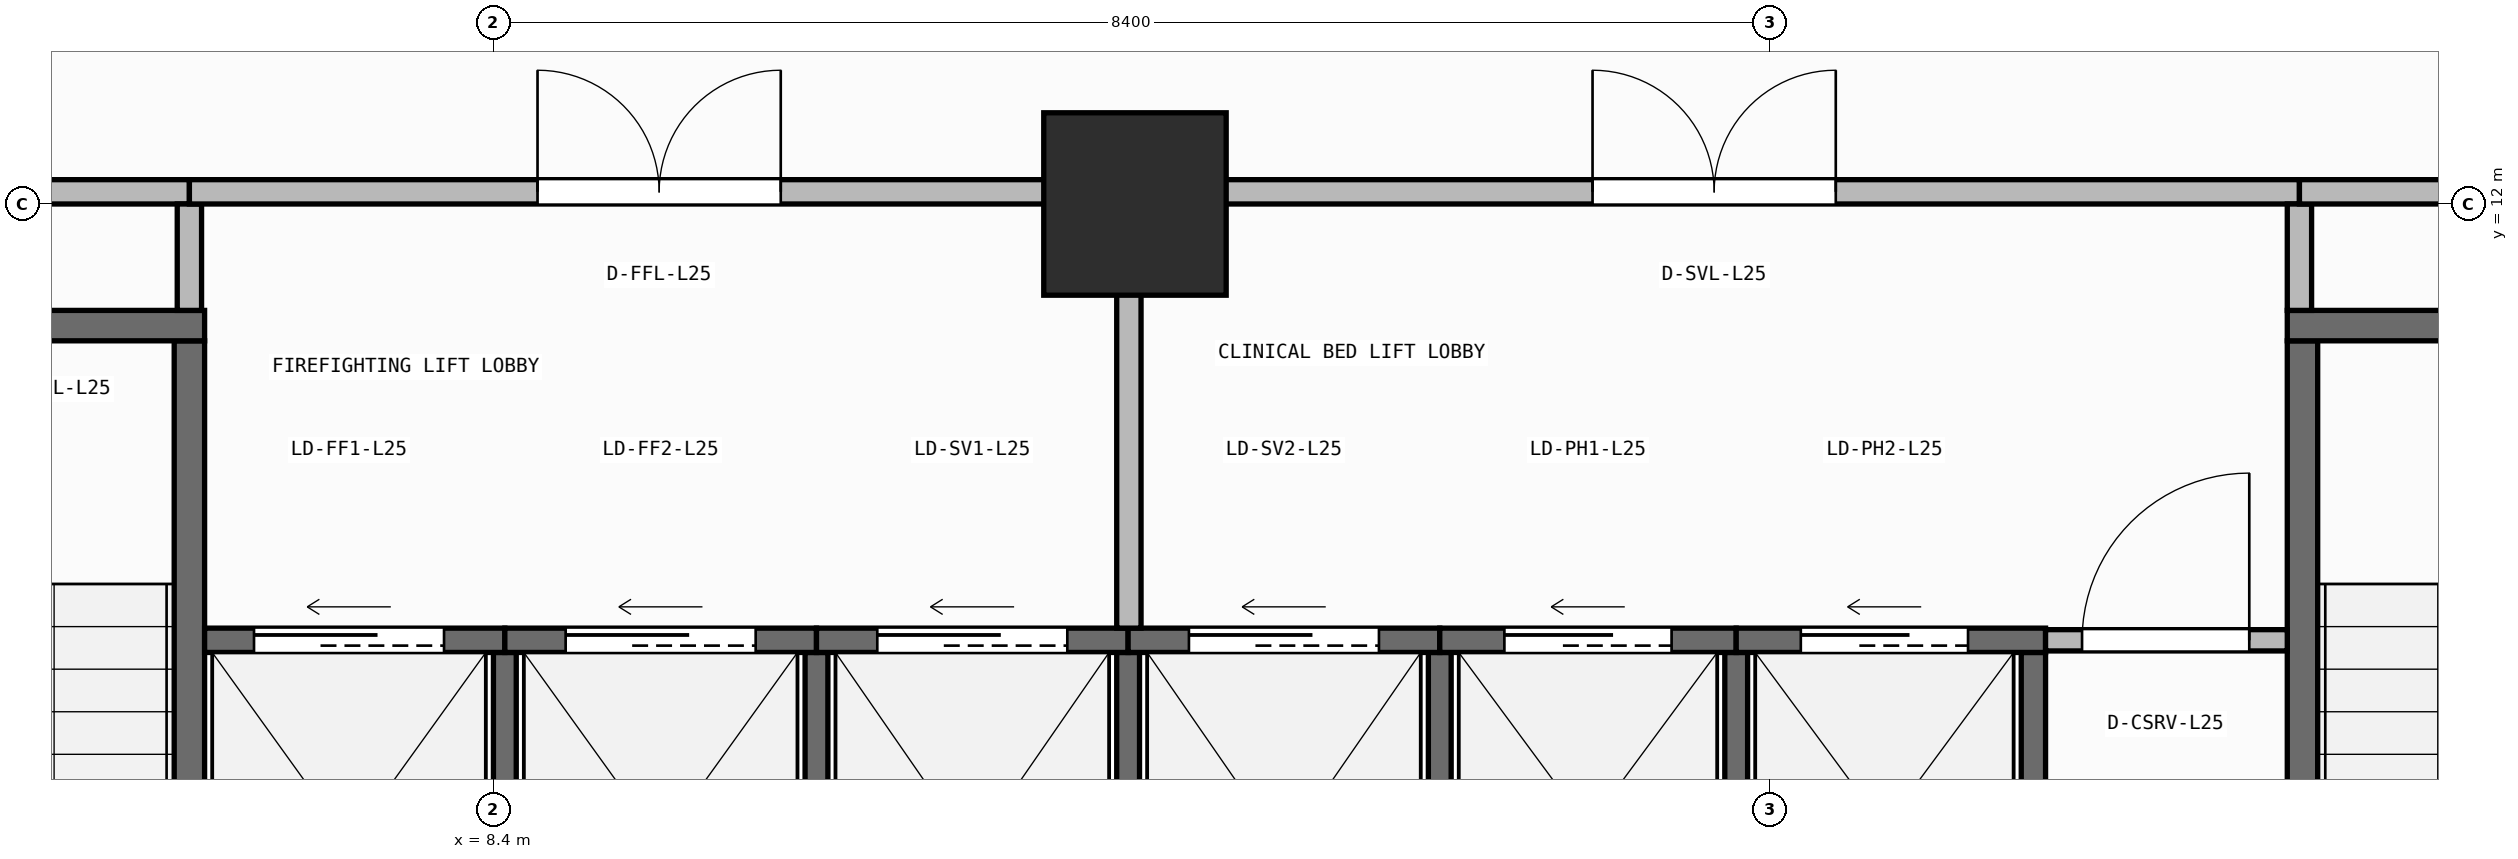
"""IFC4 building model, lengths in metres.
Left out: names, types, materials, properties, quantities, classifications, styles, units other than length and angle.
Written with IfcOpenShell. Run it as: python <this file> out.ifc"""

import sys

from ifc_helpers import new_model, si_unit, direction, frame, frame_2d, origin, origin_2d, place, context, subcontext, project, spatial, rectangle, extrude, element, fill, save


model = new_model("IFC4")
c1 = context("Model", 3, precision=1e-05, world=origin(), true_north=direction((0.0, 1.0)))
c2 = subcontext(c1, "Body", "Model", "MODEL_VIEW")
j1 = project(units=[si_unit("LENGTHUNIT", "METRE"), si_unit("PLANEANGLEUNIT", "RADIAN")], contexts=[c1])
p1 = place(None, origin())
s1 = spatial("IfcSite", under=j1, at=p1, CompositionType="ELEMENT")
p2 = place(p1, origin())
s2 = spatial("IfcBuilding", under=s1, at=p2, CompositionType="ELEMENT")
p3 = place(p2, frame((0.0, 0.0, 97.55)))
s3 = spatial("IfcBuildingStorey", under=s2, at=p3, CompositionType="ELEMENT", Elevation=97.55)
p4 = place(p3, frame((12.62, 12.0, 0.0), z_axis=(0.0, 0.0, 1.0), x_axis=(1.0, 0.0, 0.0)))
e1 = element("IfcColumn", 1, at=p4, inside=s3, PredefinedType="COLUMN", context=c2, shape_type="SweptSolid", body=[
    extrude(rectangle(XDim=1.4, YDim=1.4, at=origin_2d()), origin(), (0.0, 0.0, 1.0), 5.8),
])
p5 = place(p3, frame((6.4, 3.5, 0.0), z_axis=(0.0, 0.0, 1.0), x_axis=(0.0, 1.0, 0.0)))
e2 = element("IfcWall", 2, at=p5, inside=s3, PredefinedType="SHEAR", context=c2, shape_type="SweptSolid", body=[
    extrude(rectangle(XDim=7.6, YDim=0.2, at=frame_2d((3.8, 0.0))), origin(), (0.0, 0.0, 1.0), 5.56),
])
p6 = place(p3, frame((2.8, 11.2, 0.0), z_axis=(0.0, 0.0, 1.0), x_axis=(1.0, 0.0, 0.0)))
e3 = element("IfcWall", 3, at=p6, inside=s3, PredefinedType="SHEAR", context=c2, shape_type="SweptSolid", body=[
    extrude(rectangle(XDim=3.7, YDim=0.2, at=frame_2d((1.85, 0.0))), origin(), (0.0, 0.0, 1.0), 5.56),
])
p7 = place(p6, frame((1.2, 0.0, 0.0)))
e4 = element("IfcOpeningElement", 4, at=p7, cuts=e3, PredefinedType="OPENING", context=c2, shape_type="SweptSolid", body=[
    extrude(rectangle(XDim=1.3, YDim=2.15, at=frame_2d((0.65, 1.075))), frame((0.0, 0.11, 0.0), z_axis=(0.0, -1.0, 0.0), x_axis=(1.0, 0.0, 0.0)), (0.0, 0.0, 1.0), 0.22),
])
p8 = place(p3, frame((20.3, 3.5, 0.0), z_axis=(0.0, 0.0, 1.0), x_axis=(0.0, 1.0, 0.0)))
e5 = element("IfcWall", 5, at=p8, inside=s3, PredefinedType="SHEAR", context=c2, shape_type="SweptSolid", body=[
    extrude(rectangle(XDim=7.6, YDim=0.2, at=frame_2d((3.8, 0.0))), origin(), (0.0, 0.0, 1.0), 5.56),
])
p9 = place(p3, frame((20.2, 11.2, 0.0), z_axis=(0.0, 0.0, 1.0), x_axis=(1.0, 0.0, 0.0)))
e6 = element("IfcWall", 6, at=p9, inside=s3, PredefinedType="SHEAR", context=c2, shape_type="SweptSolid", body=[
    extrude(rectangle(XDim=3.7, YDim=0.2, at=frame_2d((1.85, 0.0))), origin(), (0.0, 0.0, 1.0), 5.56),
])
p10 = place(p9, frame((1.2, 0.0, 0.0)))
e7 = element("IfcOpeningElement", 7, at=p10, cuts=e6, PredefinedType="OPENING", context=c2, shape_type="SweptSolid", body=[
    extrude(rectangle(XDim=1.3, YDim=2.15, at=frame_2d((0.65, 1.075))), frame((0.0, 0.11, 0.0), z_axis=(0.0, -1.0, 0.0), x_axis=(1.0, 0.0, 0.0)), (0.0, 0.0, 1.0), 0.22),
])
p11 = place(p3, frame((18.53, 6.3, 0.0), z_axis=(0.0, 0.0, 1.0), x_axis=(0.0, 1.0, 0.0)))
e8 = element("IfcWall", 8, at=p11, inside=s3, PredefinedType="SHEAR", context=c2, shape_type="SweptSolid", body=[
    extrude(rectangle(XDim=2.75, YDim=0.16, at=frame_2d((1.375, 0.0))), origin(), (0.0, 0.0, 1.0), 5.56),
])
for number, where, z_axis, x_axis in (
    (9, (8.475, 6.3, 0.0), (0.0, 0.0, 1.0), (0.0, 1.0, 0.0)),
    (10, (10.525, 6.3, 0.0), (0.0, 0.0, 1.0), (0.0, 1.0, 0.0)),
    (11, (12.575, 6.3, 0.0), (0.0, 0.0, 1.0), (0.0, 1.0, 0.0)),
    (12, (14.625, 6.3, 0.0), (0.0, 0.0, 1.0), (0.0, 1.0, 0.0)),
    (13, (16.575, 6.3, 0.0), (0.0, 0.0, 1.0), (0.0, 1.0, 0.0)),
):
    element("IfcWall", number, at=place(p3, frame(where, z_axis=z_axis, x_axis=x_axis)), inside=s3, PredefinedType="SHEAR", context=c2, shape_type="SweptSolid", body=[
        extrude(rectangle(XDim=2.75, YDim=0.15, at=frame_2d((1.375, 0.0))), origin(), (0.0, 0.0, 1.0), 5.56),
    ])
p12 = place(p3, frame((6.5, 9.13, 0.0), z_axis=(0.0, 0.0, 1.0), x_axis=(1.0, 0.0, 0.0)))
e14 = element("IfcWall", 14, at=p12, inside=s3, PredefinedType="SHEAR", context=c2, shape_type="SweptSolid", body=[
    extrude(rectangle(XDim=1.975, YDim=0.16, at=frame_2d((0.988, 0.0))), origin(), (0.0, 0.0, 1.0), 5.56),
])
p13 = place(p12, frame((0.325, 0.0, 0.0)))
e15 = element("IfcOpeningElement", 15, at=p13, cuts=e14, PredefinedType="OPENING", context=c2, shape_type="SweptSolid", body=[
    extrude(rectangle(XDim=1.25, YDim=2.15, at=frame_2d((0.625, 1.075))), frame((0.0, 0.09, 0.0), z_axis=(0.0, -1.0, 0.0), x_axis=(1.0, 0.0, 0.0)), (0.0, 0.0, 1.0), 0.18),
])
p14 = place(p3, frame((8.475, 9.13, 0.0), z_axis=(0.0, 0.0, 1.0), x_axis=(1.0, 0.0, 0.0)))
e16 = element("IfcWall", 16, at=p14, inside=s3, PredefinedType="SHEAR", context=c2, shape_type="SweptSolid", body=[
    extrude(rectangle(XDim=2.05, YDim=0.16, at=frame_2d((1.025, 0.0))), origin(), (0.0, 0.0, 1.0), 5.56),
])
p15 = place(p14, frame((0.4, 0.0, 0.0)))
e17 = element("IfcOpeningElement", 17, at=p15, cuts=e16, PredefinedType="OPENING", context=c2, shape_type="SweptSolid", body=[
    extrude(rectangle(XDim=1.25, YDim=2.15, at=frame_2d((0.625, 1.075))), frame((0.0, 0.09, 0.0), z_axis=(0.0, -1.0, 0.0), x_axis=(1.0, 0.0, 0.0)), (0.0, 0.0, 1.0), 0.18),
])
p16 = place(p3, frame((10.525, 9.13, 0.0), z_axis=(0.0, 0.0, 1.0), x_axis=(1.0, 0.0, 0.0)))
e18 = element("IfcWall", 18, at=p16, inside=s3, PredefinedType="SHEAR", context=c2, shape_type="SweptSolid", body=[
    extrude(rectangle(XDim=2.05, YDim=0.16, at=frame_2d((1.025, 0.0))), origin(), (0.0, 0.0, 1.0), 5.56),
])
p17 = place(p16, frame((0.4, 0.0, 0.0)))
e19 = element("IfcOpeningElement", 19, at=p17, cuts=e18, PredefinedType="OPENING", context=c2, shape_type="SweptSolid", body=[
    extrude(rectangle(XDim=1.25, YDim=2.15, at=frame_2d((0.625, 1.075))), frame((0.0, 0.09, 0.0), z_axis=(0.0, -1.0, 0.0), x_axis=(1.0, 0.0, 0.0)), (0.0, 0.0, 1.0), 0.18),
])
p18 = place(p3, frame((12.575, 9.13, 0.0), z_axis=(0.0, 0.0, 1.0), x_axis=(1.0, 0.0, 0.0)))
e20 = element("IfcWall", 20, at=p18, inside=s3, PredefinedType="SHEAR", context=c2, shape_type="SweptSolid", body=[
    extrude(rectangle(XDim=2.05, YDim=0.16, at=frame_2d((1.025, 0.0))), origin(), (0.0, 0.0, 1.0), 5.56),
])
p19 = place(p18, frame((0.4, 0.0, 0.0)))
e21 = element("IfcOpeningElement", 21, at=p19, cuts=e20, PredefinedType="OPENING", context=c2, shape_type="SweptSolid", body=[
    extrude(rectangle(XDim=1.25, YDim=2.15, at=frame_2d((0.625, 1.075))), frame((0.0, 0.09, 0.0), z_axis=(0.0, -1.0, 0.0), x_axis=(1.0, 0.0, 0.0)), (0.0, 0.0, 1.0), 0.18),
])
p20 = place(p3, frame((14.625, 9.13, 0.0), z_axis=(0.0, 0.0, 1.0), x_axis=(1.0, 0.0, 0.0)))
e22 = element("IfcWall", 22, at=p20, inside=s3, PredefinedType="SHEAR", context=c2, shape_type="SweptSolid", body=[
    extrude(rectangle(XDim=1.95, YDim=0.16, at=frame_2d((0.975, 0.0))), origin(), (0.0, 0.0, 1.0), 5.56),
])
p21 = place(p3, frame((16.575, 9.13, 0.0), z_axis=(0.0, 0.0, 1.0), x_axis=(1.0, 0.0, 0.0)))
e23 = element("IfcWall", 23, at=p21, inside=s3, PredefinedType="SHEAR", context=c2, shape_type="SweptSolid", body=[
    extrude(rectangle(XDim=2.035, YDim=0.16, at=frame_2d((1.018, 0.0))), origin(), (0.0, 0.0, 1.0), 5.56),
])
p22 = place(p3, frame((18.61, 9.13, 0.0), z_axis=(0.0, 0.0, 1.0), x_axis=(1.0, 0.0, 0.0)))
e24 = element("IfcWall", 24, at=p22, inside=s3, PredefinedType="PARTITIONING", context=c2, shape_type="SweptSolid", body=[
    extrude(rectangle(XDim=1.59, YDim=0.14, at=frame_2d((0.795, 0.0))), origin(), (0.0, 0.0, 1.0), 5.56),
])
p23 = place(p22, frame((0.24, 0.0, 0.0)))
e25 = element("IfcOpeningElement", 25, at=p23, cuts=e24, PredefinedType="OPENING", context=c2, shape_type="SweptSolid", body=[
    extrude(rectangle(XDim=1.1, YDim=2.1, at=frame_2d((0.55, 1.05))), frame((0.0, 0.08, 0.0), z_axis=(0.0, -1.0, 0.0), x_axis=(1.0, 0.0, 0.0)), (0.0, 0.0, 1.0), 0.16),
])
p24 = place(p3, frame((2.8, 12.08, 0.0), z_axis=(0.0, 0.0, 1.0), x_axis=(1.0, 0.0, 0.0)))
e26 = element("IfcWall", 26, at=p24, inside=s3, PredefinedType="PARTITIONING", context=c2, shape_type="SweptSolid", body=[
    extrude(rectangle(XDim=3.6, YDim=0.16, at=frame_2d((1.8, 0.0))), origin(), (0.0, 0.0, 1.0), 4.835),
])
p25 = place(p24, frame((1.0, 0.0, 0.0)))
e27 = element("IfcOpeningElement", 27, at=p25, cuts=e26, PredefinedType="OPENING", context=c2, shape_type="SweptSolid", body=[
    extrude(rectangle(XDim=1.6, YDim=2.05, at=frame_2d((0.8, 1.025))), frame((0.0, 0.09, 0.0), z_axis=(0.0, -1.0, 0.0), x_axis=(1.0, 0.0, 0.0)), (0.0, 0.0, 1.0), 0.18),
])
p26 = place(p3, frame((6.4, 11.3, 0.0), z_axis=(0.0, 0.0, 1.0), x_axis=(0.0, 1.0, 0.0)))
e28 = element("IfcWall", 28, at=p26, inside=s3, PredefinedType="PARTITIONING", context=c2, shape_type="SweptSolid", body=[
    extrude(rectangle(XDim=0.7, YDim=0.16, at=frame_2d((0.35, 0.0))), origin(), (0.0, 0.0, 1.0), 5.56),
])
p27 = place(p3, frame((6.4, 12.08, 0.0), z_axis=(0.0, 0.0, 1.0), x_axis=(1.0, 0.0, 0.0)))
e29 = element("IfcWall", 29, at=p27, inside=s3, PredefinedType="PARTITIONING", context=c2, shape_type="SweptSolid", body=[
    extrude(rectangle(XDim=6.18, YDim=0.16, at=frame_2d((3.09, 0.0))), origin(), (0.0, 0.0, 1.0), 4.835),
])
p28 = place(p27, frame((2.29, 0.0, 0.0)))
e30 = element("IfcOpeningElement", 30, at=p28, cuts=e29, PredefinedType="OPENING", context=c2, shape_type="SweptSolid", body=[
    extrude(rectangle(XDim=1.6, YDim=2.05, at=frame_2d((0.8, 1.025))), frame((0.0, 0.09, 0.0), z_axis=(0.0, -1.0, 0.0), x_axis=(1.0, 0.0, 0.0)), (0.0, 0.0, 1.0), 0.18),
])
p29 = place(p3, frame((12.58, 9.21, 0.0), z_axis=(0.0, 0.0, 1.0), x_axis=(0.0, 1.0, 0.0)))
e31 = element("IfcWall", 31, at=p29, inside=s3, PredefinedType="PARTITIONING", context=c2, shape_type="SweptSolid", body=[
    extrude(rectangle(XDim=2.79, YDim=0.16, at=frame_2d((1.395, 0.0))), origin(), (0.0, 0.0, 1.0), 5.56),
])
p30 = place(p3, frame((12.58, 12.08, 0.0), z_axis=(0.0, 0.0, 1.0), x_axis=(1.0, 0.0, 0.0)))
e32 = element("IfcWall", 32, at=p30, inside=s3, PredefinedType="PARTITIONING", context=c2, shape_type="SweptSolid", body=[
    extrude(rectangle(XDim=7.7, YDim=0.16, at=frame_2d((3.85, 0.0))), origin(), (0.0, 0.0, 1.0), 4.835),
])
p31 = place(p30, frame((3.05, 0.0, 0.0)))
e33 = element("IfcOpeningElement", 33, at=p31, cuts=e32, PredefinedType="OPENING", context=c2, shape_type="SweptSolid", body=[
    extrude(rectangle(XDim=1.6, YDim=2.05, at=frame_2d((0.8, 1.025))), frame((0.0, 0.09, 0.0), z_axis=(0.0, -1.0, 0.0), x_axis=(1.0, 0.0, 0.0)), (0.0, 0.0, 1.0), 0.18),
])
p32 = place(p3, frame((20.28, 11.3, 0.0), z_axis=(0.0, 0.0, 1.0), x_axis=(0.0, 1.0, 0.0)))
e34 = element("IfcWall", 34, at=p32, inside=s3, PredefinedType="PARTITIONING", context=c2, shape_type="SweptSolid", body=[
    extrude(rectangle(XDim=0.7, YDim=0.16, at=frame_2d((0.35, 0.0))), origin(), (0.0, 0.0, 1.0), 5.56),
])
p33 = place(p3, frame((20.28, 12.08, 0.0), z_axis=(0.0, 0.0, 1.0), x_axis=(1.0, 0.0, 0.0)))
e35 = element("IfcWall", 35, at=p33, inside=s3, PredefinedType="PARTITIONING", context=c2, shape_type="SweptSolid", body=[
    extrude(rectangle(XDim=3.62, YDim=0.16, at=frame_2d((1.81, 0.0))), origin(), (0.0, 0.0, 1.0), 4.835),
])
p34 = place(p33, frame((1.01, 0.0, 0.0)))
e36 = element("IfcOpeningElement", 36, at=p34, cuts=e35, PredefinedType="OPENING", context=c2, shape_type="SweptSolid", body=[
    extrude(rectangle(XDim=1.6, YDim=2.05, at=frame_2d((0.8, 1.025))), frame((0.0, 0.09, 0.0), z_axis=(0.0, -1.0, 0.0), x_axis=(1.0, 0.0, 0.0)), (0.0, 0.0, 1.0), 0.18),
])
p35 = place(p13, origin())
e37 = element("IfcDoor", 37, at=p35, inside=s3, OperationType="SLIDING_TO_LEFT", PredefinedType="DOOR", context=c2, shape_type="SweptSolid", body=[
    extrude(rectangle(XDim=1.25, YDim=2.15, at=frame_2d((0.625, 1.075))), frame((0.0, 0.025, 0.0), z_axis=(0.0, -1.0, 0.0), x_axis=(1.0, 0.0, 0.0)), (0.0, 0.0, 1.0), 0.05),
])
fill(e15, e37)
p36 = place(p15, origin())
e38 = element("IfcDoor", 38, at=p36, inside=s3, OperationType="SLIDING_TO_LEFT", PredefinedType="DOOR", context=c2, shape_type="SweptSolid", body=[
    extrude(rectangle(XDim=1.25, YDim=2.15, at=frame_2d((0.625, 1.075))), frame((0.0, 0.025, 0.0), z_axis=(0.0, -1.0, 0.0), x_axis=(1.0, 0.0, 0.0)), (0.0, 0.0, 1.0), 0.05),
])
fill(e17, e38)
p37 = place(p17, origin())
e39 = element("IfcDoor", 39, at=p37, inside=s3, OperationType="SLIDING_TO_LEFT", PredefinedType="DOOR", context=c2, shape_type="SweptSolid", body=[
    extrude(rectangle(XDim=1.25, YDim=2.15, at=frame_2d((0.625, 1.075))), frame((0.0, 0.025, 0.0), z_axis=(0.0, -1.0, 0.0), x_axis=(1.0, 0.0, 0.0)), (0.0, 0.0, 1.0), 0.05),
])
fill(e19, e39)
p38 = place(p19, origin())
e40 = element("IfcDoor", 40, at=p38, inside=s3, OperationType="SLIDING_TO_LEFT", PredefinedType="DOOR", context=c2, shape_type="SweptSolid", body=[
    extrude(rectangle(XDim=1.25, YDim=2.15, at=frame_2d((0.625, 1.075))), frame((0.0, 0.025, 0.0), z_axis=(0.0, -1.0, 0.0), x_axis=(1.0, 0.0, 0.0)), (0.0, 0.0, 1.0), 0.05),
])
fill(e21, e40)
p39 = place(p23, origin())
e41 = element("IfcDoor", 41, at=p39, inside=s3, OperationType="SINGLE_SWING_LEFT", PredefinedType="DOOR", context=c2, shape_type="SweptSolid", body=[
    extrude(rectangle(XDim=1.1, YDim=2.1, at=frame_2d((0.55, 1.05))), frame((0.0, 0.025, 0.0), z_axis=(0.0, -1.0, 0.0), x_axis=(1.0, 0.0, 0.0)), (0.0, 0.0, 1.0), 0.05),
])
fill(e25, e41)
p40 = place(p28, origin())
e42 = element("IfcDoor", 42, at=p40, inside=s3, OperationType="DOUBLE_DOOR_SINGLE_SWING", PredefinedType="DOOR", context=c2, shape_type="SweptSolid", body=[
    extrude(rectangle(XDim=1.6, YDim=2.05, at=frame_2d((0.8, 1.025))), frame((0.0, 0.025, 0.0), z_axis=(0.0, -1.0, 0.0), x_axis=(1.0, 0.0, 0.0)), (0.0, 0.0, 1.0), 0.05),
])
fill(e30, e42)
p41 = place(p31, origin())
e43 = element("IfcDoor", 43, at=p41, inside=s3, OperationType="DOUBLE_DOOR_SINGLE_SWING", PredefinedType="DOOR", context=c2, shape_type="SweptSolid", body=[
    extrude(rectangle(XDim=1.6, YDim=2.05, at=frame_2d((0.8, 1.025))), frame((0.0, 0.025, 0.0), z_axis=(0.0, -1.0, 0.0), x_axis=(1.0, 0.0, 0.0)), (0.0, 0.0, 1.0), 0.05),
])
fill(e33, e43)
save(model, sys.argv[1])
